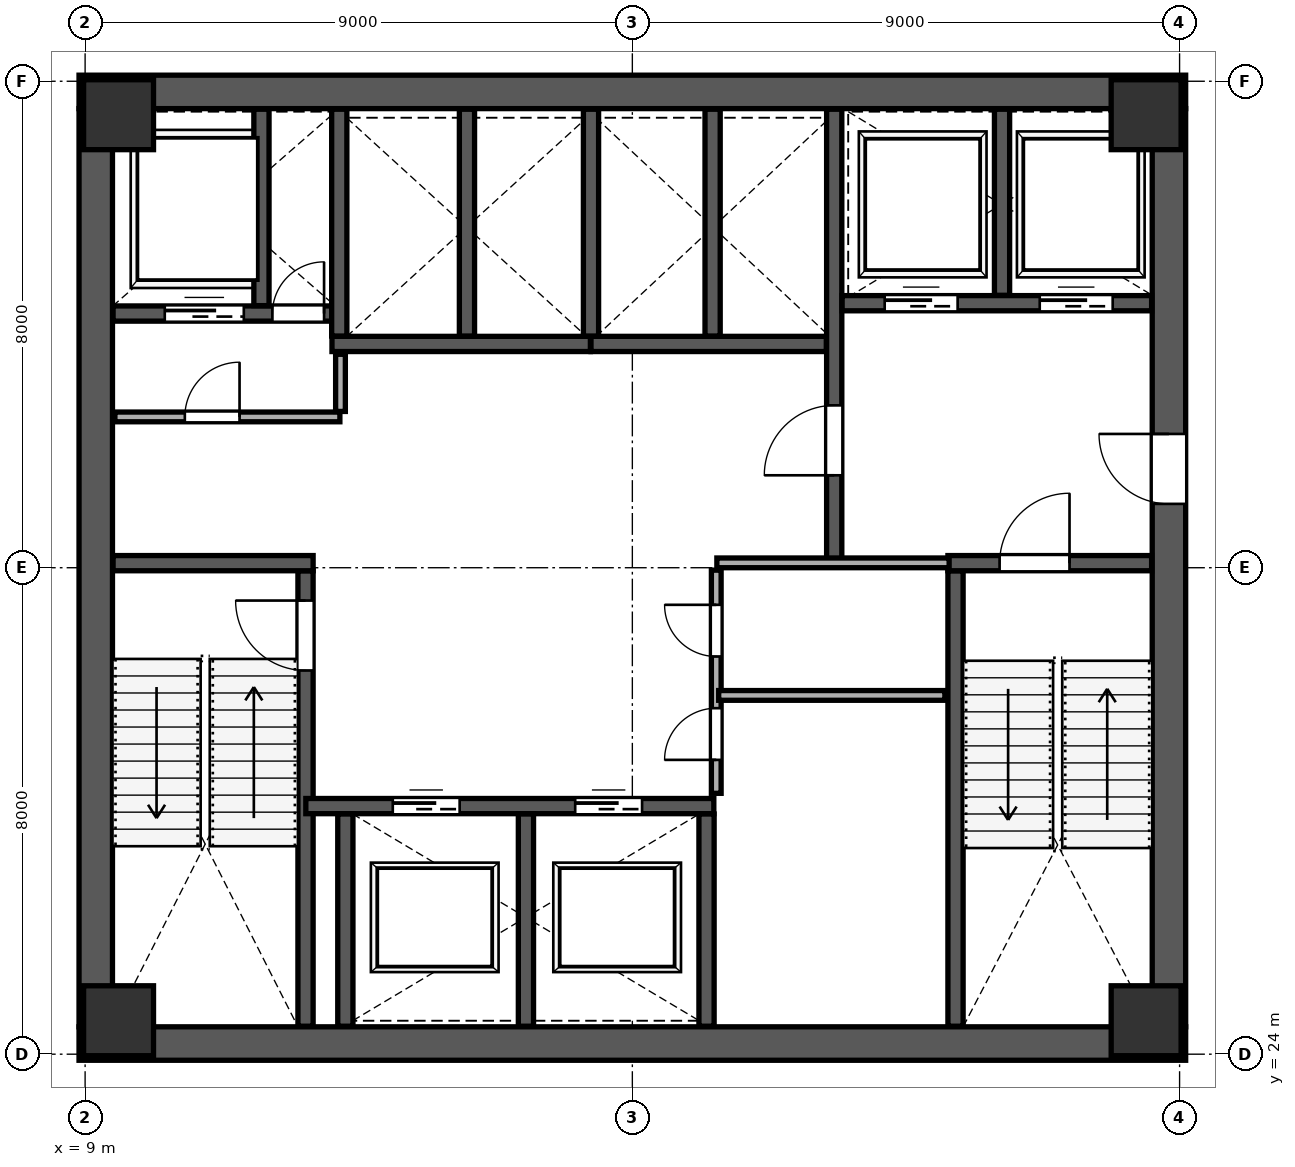
"""IFC4 building model, lengths in metres.
Left out: names, types, materials, properties, quantities, classifications, styles, units other than length and angle.
Written with IfcOpenShell. Run it as: python <this file> out.ifc"""

import sys

from ifc_helpers import new_model, si_unit, direction, frame, frame_2d, origin, origin_2d, place, context, subcontext, project, spatial, rectangle, extrude, source, transform, mapped, element, fill, save


model = new_model("IFC4")
c1 = context("Model", 3, precision=1e-05, world=origin(), true_north=direction((0.0, 1.0)))
c2 = subcontext(c1, "Body", "Model", "MODEL_VIEW")
j1 = project(units=[si_unit("LENGTHUNIT", "METRE"), si_unit("PLANEANGLEUNIT", "RADIAN")], contexts=[c1])
p1 = place(None, origin())
s1 = spatial("IfcSite", under=j1, at=p1, CompositionType="ELEMENT")
p2 = place(p1, origin())
s2 = spatial("IfcBuilding", under=s1, at=p2, CompositionType="ELEMENT")
p3 = place(p2, frame((0.0, 0.0, 83.2)))
s3 = spatial("IfcBuildingStorey", under=s2, at=p3, CompositionType="ELEMENT", Elevation=83.2)
m1 = source(origin(), c2, "Body", "SweptSolid", [
    extrude(rectangle(XDim=1.15, YDim=1.15, at=origin_2d()), origin(), (0.0, 0.0, 1.0), 4.198),
])
for number, where, z_axis, x_axis in (
    (1, (9.55, 24.55, 0.001), (0.0, 0.0, 1.0), (1.0, 0.0, 0.0)),
    (2, (26.45, 24.55, 0.001), (0.0, 0.0, 1.0), (1.0, 0.0, 0.0)),
    (3, (9.55, 39.45, 0.001), (0.0, 0.0, 1.0), (1.0, 0.0, 0.0)),
    (4, (26.45, 39.45, 0.001), (0.0, 0.0, 1.0), (1.0, 0.0, 0.0)),
):
    element("IfcColumn", number, at=place(p3, frame(where, z_axis=z_axis, x_axis=x_axis)), inside=s3, PredefinedType="COLUMN", context=c2, shape_type="MappedRepresentation", body=[
        mapped(m1, transform((0.0, 0.0, 0.0), scale=1.0)),
    ])
p4 = place(p3, frame((9.175, 24.45, 0.0), z_axis=(0.0, 0.0, 1.0), x_axis=(0.0, 1.0, 0.0)))
e5 = element("IfcWall", 5, at=p4, inside=s3, PredefinedType="SHEAR", context=c2, shape_type="SweptSolid", body=[
    extrude(rectangle(XDim=15.1, YDim=0.55, at=frame_2d((7.55, 0.0))), origin(), (0.0, 0.0, 1.0), 3.96),
])
p5 = place(p3, frame((26.825, 24.45, 0.0), z_axis=(0.0, 0.0, 1.0), x_axis=(0.0, 1.0, 0.0)))
e6 = element("IfcWall", 6, at=p5, inside=s3, PredefinedType="SHEAR", context=c2, shape_type="SweptSolid", body=[
    extrude(rectangle(XDim=15.1, YDim=0.55, at=frame_2d((7.55, 0.0))), origin(), (0.0, 0.0, 1.0), 3.96),
])
p6 = place(p5, frame((8.6, 0.0, 0.0)))
e7 = element("IfcOpeningElement", 7, at=p6, cuts=e6, PredefinedType="OPENING", context=c2, shape_type="SweptSolid", body=[
    extrude(rectangle(XDim=1.15, YDim=2.2, at=frame_2d((0.575, 1.1))), frame((0.0, 0.285, 0.0), z_axis=(0.0, -1.0, 0.0), x_axis=(1.0, 0.0, 0.0)), (0.0, 0.0, 1.0), 0.57),
])
for number, where, z_axis, x_axis in (
    (8, (8.9, 24.175, 0.0), (0.0, 0.0, 1.0), (1.0, 0.0, 0.0)),
    (9, (8.9, 39.825, 0.0), (0.0, 0.0, 1.0), (1.0, 0.0, 0.0)),
):
    element("IfcWall", number, at=place(p3, frame(where, z_axis=z_axis, x_axis=x_axis)), inside=s3, PredefinedType="SHEAR", context=c2, shape_type="SweptSolid", body=[
        extrude(rectangle(XDim=18.2, YDim=0.55, at=frame_2d((9.1, 0.0))), origin(), (0.0, 0.0, 1.0), 3.96),
    ])
p7 = place(p3, frame((12.625, 24.46, 0.0), z_axis=(0.0, 0.0, 1.0), x_axis=(0.0, 1.0, 0.0)))
e10 = element("IfcWall", 10, at=p7, inside=s3, PredefinedType="SHEAR", context=c2, shape_type="SweptSolid", body=[
    extrude(rectangle(XDim=7.49, YDim=0.25, at=frame_2d((3.745, 0.0))), origin(), (0.0, 0.0, 1.0), 3.96),
])
p8 = place(p7, frame((5.85, 0.0, 0.0)))
e11 = element("IfcOpeningElement", 11, at=p8, cuts=e10, PredefinedType="OPENING", context=c2, shape_type="SweptSolid", body=[
    extrude(rectangle(XDim=1.15, YDim=2.2, at=frame_2d((0.575, 1.1))), frame((0.0, 0.135, 0.0), z_axis=(0.0, -1.0, 0.0), x_axis=(1.0, 0.0, 0.0)), (0.0, 0.0, 1.0), 0.27),
])
p9 = place(p3, frame((9.46, 32.075, 0.0), z_axis=(0.0, 0.0, 1.0), x_axis=(1.0, 0.0, 0.0)))
e12 = element("IfcWall", 12, at=p9, inside=s3, PredefinedType="SHEAR", context=c2, shape_type="SweptSolid", body=[
    extrude(rectangle(XDim=3.29, YDim=0.25, at=frame_2d((1.645, 0.0))), origin(), (0.0, 0.0, 1.0), 3.96),
])
p10 = place(p3, frame((23.315, 24.46, 0.0), z_axis=(0.0, 0.0, 1.0), x_axis=(0.0, 1.0, 0.0)))
e13 = element("IfcWall", 13, at=p10, inside=s3, PredefinedType="SHEAR", context=c2, shape_type="SweptSolid", body=[
    extrude(rectangle(XDim=7.49, YDim=0.25, at=frame_2d((3.745, 0.0))), origin(), (0.0, 0.0, 1.0), 3.96),
])
p11 = place(p3, frame((23.19, 32.075, 0.0), z_axis=(0.0, 0.0, 1.0), x_axis=(1.0, 0.0, 0.0)))
e14 = element("IfcWall", 14, at=p11, inside=s3, PredefinedType="SHEAR", context=c2, shape_type="SweptSolid", body=[
    extrude(rectangle(XDim=3.35, YDim=0.25, at=frame_2d((1.675, 0.0))), origin(), (0.0, 0.0, 1.0), 3.96),
])
p12 = place(p11, frame((0.85, 0.0, 0.0)))
e15 = element("IfcOpeningElement", 15, at=p12, cuts=e14, PredefinedType="OPENING", context=c2, shape_type="SweptSolid", body=[
    extrude(rectangle(XDim=1.15, YDim=2.2, at=frame_2d((0.575, 1.1))), frame((0.0, 0.135, 0.0), z_axis=(0.0, -1.0, 0.0), x_axis=(1.0, 0.0, 0.0)), (0.0, 0.0, 1.0), 0.27),
])
p13 = place(p3, frame((21.32, 32.12, 0.0), z_axis=(0.0, 0.0, 1.0), x_axis=(0.0, 1.0, 0.0)))
e16 = element("IfcWall", 16, at=p13, inside=s3, PredefinedType="SHEAR", context=c2, shape_type="SweptSolid", body=[
    extrude(rectangle(XDim=7.42, YDim=0.25, at=frame_2d((3.71, 0.0))), origin(), (0.0, 0.0, 1.0), 3.96),
])
p14 = place(p13, frame((1.4, 0.0, 0.0)))
e17 = element("IfcOpeningElement", 17, at=p14, cuts=e16, PredefinedType="OPENING", context=c2, shape_type="SweptSolid", body=[
    extrude(rectangle(XDim=1.15, YDim=2.2, at=frame_2d((0.575, 1.1))), frame((0.0, 0.135, 0.0), z_axis=(0.0, -1.0, 0.0), x_axis=(1.0, 0.0, 0.0)), (0.0, 0.0, 1.0), 0.27),
])
p15 = place(p3, frame((9.46, 36.18, 0.0), z_axis=(0.0, 0.0, 1.0), x_axis=(1.0, 0.0, 0.0)))
e18 = element("IfcWall", 18, at=p15, inside=s3, PredefinedType="SHEAR", context=c2, shape_type="SweptSolid", body=[
    extrude(rectangle(XDim=3.79, YDim=0.25, at=frame_2d((1.895, 0.0))), origin(), (0.0, 0.0, 1.0), 3.96),
])
p16 = place(p15, frame((2.62, 0.0, 0.0)))
e19 = element("IfcOpeningElement", 19, at=p16, cuts=e18, PredefinedType="OPENING", context=c2, shape_type="SweptSolid", body=[
    extrude(rectangle(XDim=0.85, YDim=2.1, at=frame_2d((0.425, 1.05))), frame((0.0, 0.135, 0.0), z_axis=(0.0, -1.0, 0.0), x_axis=(1.0, 0.0, 0.0)), (0.0, 0.0, 1.0), 0.27),
])
p17 = place(p15, frame((0.85, 0.0, 0.0)))
e20 = element("IfcOpeningElement", 20, at=p17, cuts=e18, PredefinedType="OPENING", context=c2, shape_type="SweptSolid", body=[
    extrude(rectangle(XDim=1.3, YDim=2.25, at=frame_2d((0.65, 1.125))), frame((0.0, 0.135, 0.0), z_axis=(0.0, -1.0, 0.0), x_axis=(1.0, 0.0, 0.0)), (0.0, 0.0, 1.0), 0.27),
])
p18 = place(p3, frame((11.9, 36.31, 0.0), z_axis=(0.0, 0.0, 1.0), x_axis=(0.0, 1.0, 0.0)))
e21 = element("IfcWall", 21, at=p18, inside=s3, PredefinedType="SHEAR", context=c2, shape_type="SweptSolid", body=[
    extrude(rectangle(XDim=3.23, YDim=0.25, at=frame_2d((1.615, 0.0))), origin(), (0.0, 0.0, 1.0), 3.96),
])
p19 = place(p3, frame((21.45, 36.35, 0.0), z_axis=(0.0, 0.0, 1.0), x_axis=(1.0, 0.0, 0.0)))
e22 = element("IfcWall", 22, at=p19, inside=s3, PredefinedType="SHEAR", context=c2, shape_type="SweptSolid", body=[
    extrude(rectangle(XDim=5.09, YDim=0.25, at=frame_2d((2.545, 0.0))), origin(), (0.0, 0.0, 1.0), 3.96),
])
p20 = place(p19, frame((0.7, 0.0, 0.0)))
e23 = element("IfcOpeningElement", 23, at=p20, cuts=e22, PredefinedType="OPENING", context=c2, shape_type="SweptSolid", body=[
    extrude(rectangle(XDim=1.2, YDim=2.2, at=frame_2d((0.6, 1.1))), frame((0.0, 0.135, 0.0), z_axis=(0.0, -1.0, 0.0), x_axis=(1.0, 0.0, 0.0)), (0.0, 0.0, 1.0), 0.27),
])
p21 = place(p19, frame((3.25, 0.0, 0.0)))
e24 = element("IfcOpeningElement", 24, at=p21, cuts=e22, PredefinedType="OPENING", context=c2, shape_type="SweptSolid", body=[
    extrude(rectangle(XDim=1.2, YDim=2.2, at=frame_2d((0.6, 1.1))), frame((0.0, 0.135, 0.0), z_axis=(0.0, -1.0, 0.0), x_axis=(1.0, 0.0, 0.0)), (0.0, 0.0, 1.0), 0.27),
])
p22 = place(p3, frame((24.08, 36.48, 0.0), z_axis=(0.0, 0.0, 1.0), x_axis=(0.0, 1.0, 0.0)))
e25 = element("IfcWall", 25, at=p22, inside=s3, PredefinedType="SHEAR", context=c2, shape_type="SweptSolid", body=[
    extrude(rectangle(XDim=3.06, YDim=0.25, at=frame_2d((1.53, 0.0))), origin(), (0.0, 0.0, 1.0), 3.96),
])
p23 = place(p3, frame((12.63, 28.08, 0.0), z_axis=(0.0, 0.0, 1.0), x_axis=(1.0, 0.0, 0.0)))
e26 = element("IfcWall", 26, at=p23, inside=s3, PredefinedType="SHEAR", context=c2, shape_type="SweptSolid", body=[
    extrude(rectangle(XDim=6.71, YDim=0.25, at=frame_2d((3.355, 0.0))), origin(), (0.0, 0.0, 1.0), 3.96),
])
p24 = place(p23, frame((1.43, 0.0, 0.0)))
e27 = element("IfcOpeningElement", 27, at=p24, cuts=e26, PredefinedType="OPENING", context=c2, shape_type="SweptSolid", body=[
    extrude(rectangle(XDim=1.1, YDim=2.2, at=frame_2d((0.55, 1.1))), frame((0.0, 0.135, 0.0), z_axis=(0.0, -1.0, 0.0), x_axis=(1.0, 0.0, 0.0)), (0.0, 0.0, 1.0), 0.27),
])
p25 = place(p23, frame((4.43, 0.0, 0.0)))
e28 = element("IfcOpeningElement", 28, at=p25, cuts=e26, PredefinedType="OPENING", context=c2, shape_type="SweptSolid", body=[
    extrude(rectangle(XDim=1.1, YDim=2.2, at=frame_2d((0.55, 1.1))), frame((0.0, 0.135, 0.0), z_axis=(0.0, -1.0, 0.0), x_axis=(1.0, 0.0, 0.0)), (0.0, 0.0, 1.0), 0.27),
])
for number, where, z_axis, x_axis in (
    (29, (13.28, 24.46, 0.0), (0.0, 0.0, 1.0), (0.0, 1.0, 0.0)),
    (30, (16.25, 24.46, 0.0), (0.0, 0.0, 1.0), (0.0, 1.0, 0.0)),
    (31, (19.22, 24.46, 0.0), (0.0, 0.0, 1.0), (0.0, 1.0, 0.0)),
):
    element("IfcWall", number, at=place(p3, frame(where, z_axis=z_axis, x_axis=x_axis)), inside=s3, PredefinedType="SHEAR", context=c2, shape_type="SweptSolid", body=[
        extrude(rectangle(XDim=3.49, YDim=0.25, at=frame_2d((1.745, 0.0))), origin(), (0.0, 0.0, 1.0), 3.96),
    ])
p26 = place(p3, frame((13.06, 35.68, 0.0), z_axis=(0.0, 0.0, 1.0), x_axis=(1.0, 0.0, 0.0)))
e32 = element("IfcWall", 32, at=p26, inside=s3, PredefinedType="SHEAR", context=c2, shape_type="SweptSolid", body=[
    extrude(rectangle(XDim=4.25, YDim=0.25, at=frame_2d((2.125, 0.0))), origin(), (0.0, 0.0, 1.0), 3.96),
])
for number, where, z_axis, x_axis in (
    (33, (13.18, 35.81, 0.0), (0.0, 0.0, 1.0), (0.0, 1.0, 0.0)),
    (34, (15.28, 35.81, 0.0), (0.0, 0.0, 1.0), (0.0, 1.0, 0.0)),
):
    element("IfcWall", number, at=place(p3, frame(where, z_axis=z_axis, x_axis=x_axis)), inside=s3, PredefinedType="SHEAR", context=c2, shape_type="SweptSolid", body=[
        extrude(rectangle(XDim=3.73, YDim=0.25, at=frame_2d((1.865, 0.0))), origin(), (0.0, 0.0, 1.0), 3.96),
    ])
p27 = place(p3, frame((17.32, 35.68, 0.0), z_axis=(0.0, 0.0, 1.0), x_axis=(1.0, 0.0, 0.0)))
e35 = element("IfcWall", 35, at=p27, inside=s3, PredefinedType="SHEAR", context=c2, shape_type="SweptSolid", body=[
    extrude(rectangle(XDim=3.87, YDim=0.25, at=frame_2d((1.935, 0.0))), origin(), (0.0, 0.0, 1.0), 3.96),
])
for number, where, z_axis, x_axis in (
    (36, (17.32, 35.81, 0.0), (0.0, 0.0, 1.0), (0.0, 1.0, 0.0)),
    (37, (19.32, 35.81, 0.0), (0.0, 0.0, 1.0), (0.0, 1.0, 0.0)),
):
    element("IfcWall", number, at=place(p3, frame(where, z_axis=z_axis, x_axis=x_axis)), inside=s3, PredefinedType="SHEAR", context=c2, shape_type="SweptSolid", body=[
        extrude(rectangle(XDim=3.73, YDim=0.25, at=frame_2d((1.865, 0.0))), origin(), (0.0, 0.0, 1.0), 3.96),
    ])
p28 = place(p3, frame((9.49, 34.48, 0.0), z_axis=(0.0, 0.0, 1.0), x_axis=(1.0, 0.0, 0.0)))
e38 = element("IfcWall", 38, at=p28, inside=s3, PredefinedType="PARTITIONING", context=c2, shape_type="SweptSolid", body=[
    extrude(rectangle(XDim=3.7, YDim=0.16, at=frame_2d((1.85, 0.0))), origin(), (0.0, 0.0, 1.0), 3.96),
])
p29 = place(p28, frame((1.15, 0.0, 0.0)))
e39 = element("IfcOpeningElement", 39, at=p29, cuts=e38, PredefinedType="OPENING", context=c2, shape_type="SweptSolid", body=[
    extrude(rectangle(XDim=0.9, YDim=2.15, at=frame_2d((0.45, 1.075))), frame((0.0, 0.09, 0.0), z_axis=(0.0, -1.0, 0.0), x_axis=(1.0, 0.0, 0.0)), (0.0, 0.0, 1.0), 0.18),
])
p30 = place(p3, frame((13.2, 34.57, 0.0), z_axis=(0.0, 0.0, 1.0), x_axis=(0.0, 1.0, 0.0)))
e40 = element("IfcWall", 40, at=p30, inside=s3, PredefinedType="PARTITIONING", context=c2, shape_type="SweptSolid", body=[
    extrude(rectangle(XDim=0.94, YDim=0.16, at=frame_2d((0.47, 0.0))), origin(), (0.0, 0.0, 1.0), 3.96),
])
p31 = place(p3, frame((19.39, 32.08, 0.0), z_axis=(0.0, 0.0, 1.0), x_axis=(1.0, 0.0, 0.0)))
e41 = element("IfcWall", 41, at=p31, inside=s3, PredefinedType="PARTITIONING", context=c2, shape_type="SweptSolid", body=[
    extrude(rectangle(XDim=3.82, YDim=0.16, at=frame_2d((1.91, 0.0))), origin(), (0.0, 0.0, 1.0), 3.96),
])
p32 = place(p3, frame((19.38, 28.29, 0.0), z_axis=(0.0, 0.0, 1.0), x_axis=(0.0, 1.0, 0.0)))
e42 = element("IfcWall", 42, at=p32, inside=s3, PredefinedType="PARTITIONING", context=c2, shape_type="SweptSolid", body=[
    extrude(rectangle(XDim=3.67, YDim=0.16, at=frame_2d((1.835, 0.0))), origin(), (0.0, 0.0, 1.0), 3.96),
])
p33 = place(p32, frame((0.55, 0.0, 0.0)))
e43 = element("IfcOpeningElement", 43, at=p33, cuts=e42, PredefinedType="OPENING", context=c2, shape_type="SweptSolid", body=[
    extrude(rectangle(XDim=0.85, YDim=2.1, at=frame_2d((0.425, 1.05))), frame((0.0, 0.09, 0.0), z_axis=(0.0, -1.0, 0.0), x_axis=(1.0, 0.0, 0.0)), (0.0, 0.0, 1.0), 0.18),
])
p34 = place(p32, frame((2.25, 0.0, 0.0)))
e44 = element("IfcOpeningElement", 44, at=p34, cuts=e42, PredefinedType="OPENING", context=c2, shape_type="SweptSolid", body=[
    extrude(rectangle(XDim=0.85, YDim=2.1, at=frame_2d((0.425, 1.05))), frame((0.0, 0.09, 0.0), z_axis=(0.0, -1.0, 0.0), x_axis=(1.0, 0.0, 0.0)), (0.0, 0.0, 1.0), 0.18),
])
p35 = place(p3, frame((19.42, 29.9, 0.0), z_axis=(0.0, 0.0, 1.0), x_axis=(1.0, 0.0, 0.0)))
e45 = element("IfcWall", 45, at=p35, inside=s3, PredefinedType="PARTITIONING", context=c2, shape_type="SweptSolid", body=[
    extrude(rectangle(XDim=3.72, YDim=0.16, at=frame_2d((1.86, 0.0))), origin(), (0.0, 0.0, 1.0), 3.96),
])
p36 = place(p3, frame((27.067, 12.72, 0.0), z_axis=(0.0, 0.0, 1.0), x_axis=(0.173654514703, 0.984806635601, 0.0)))
e46 = element("IfcWall", 46, at=p36, inside=s3, PredefinedType="PARTITIONING", context=c2, shape_type="SweptSolid", body=[
    extrude(rectangle(XDim=21.08, YDim=0.16, at=frame_2d((10.54, 0.0))), origin(), (0.0, 0.0, 1.0), 3.96),
])
m2 = source(origin(), c2, "Body", "SweptSolid", [
    extrude(rectangle(XDim=1.15, YDim=2.2, at=frame_2d((0.575, 1.1))), frame((0.0, 0.025, 0.0), z_axis=(0.0, -1.0, 0.0), x_axis=(1.0, 0.0, 0.0)), (0.0, 0.0, 1.0), 0.05),
])
p37 = place(p8, origin())
e47 = element("IfcDoor", 47, at=p37, inside=s3, OperationType="SINGLE_SWING_RIGHT", PredefinedType="DOOR", context=c2, shape_type="MappedRepresentation", body=[
    mapped(m2, transform((0.0, 0.0, 0.0), scale=1.0)),
])
fill(e11, e47)
m3 = source(origin(), c2, "Body", "SweptSolid", [
    extrude(rectangle(XDim=1.15, YDim=2.2, at=frame_2d((0.575, 1.1))), frame((0.0, 0.025, 0.0), z_axis=(0.0, -1.0, 0.0), x_axis=(1.0, 0.0, 0.0)), (0.0, 0.0, 1.0), 0.05),
])
p38 = place(p14, origin())
e48 = element("IfcDoor", 48, at=p38, inside=s3, OperationType="SINGLE_SWING_LEFT", PredefinedType="DOOR", context=c2, shape_type="MappedRepresentation", body=[
    mapped(m3, transform((0.0, 0.0, 0.0), scale=1.0)),
])
fill(e17, e48)
p39 = place(p12, origin())
e49 = element("IfcDoor", 49, at=p39, inside=s3, OperationType="SINGLE_SWING_RIGHT", PredefinedType="DOOR", context=c2, shape_type="MappedRepresentation", body=[
    mapped(m2, transform((0.0, 0.0, 0.0), scale=1.0)),
])
fill(e15, e49)
p40 = place(p6, origin())
e50 = element("IfcDoor", 50, at=p40, inside=s3, OperationType="SINGLE_SWING_RIGHT", PredefinedType="DOOR", context=c2, shape_type="MappedRepresentation", body=[
    mapped(m3, transform((0.0, 0.0, 0.0), scale=1.0)),
])
fill(e7, e50)
m4 = source(origin(), c2, "Body", "SweptSolid", [
    extrude(rectangle(XDim=0.85, YDim=2.1, at=frame_2d((0.425, 1.05))), frame((0.0, 0.025, 0.0), z_axis=(0.0, -1.0, 0.0), x_axis=(1.0, 0.0, 0.0)), (0.0, 0.0, 1.0), 0.05),
])
p41 = place(p16, origin())
e51 = element("IfcDoor", 51, at=p41, inside=s3, OperationType="SINGLE_SWING_RIGHT", PredefinedType="DOOR", context=c2, shape_type="MappedRepresentation", body=[
    mapped(m4, transform((0.0, 0.0, 0.0), scale=1.0)),
])
fill(e19, e51)
m5 = source(origin(), c2, "Body", "SweptSolid", [
    extrude(rectangle(XDim=1.1, YDim=2.2, at=frame_2d((0.55, 1.1))), frame((0.0, 0.025, 0.0), z_axis=(0.0, -1.0, 0.0), x_axis=(1.0, 0.0, 0.0)), (0.0, 0.0, 1.0), 0.05),
])
p42 = place(p24, origin())
e52 = element("IfcDoor", 52, at=p42, inside=s3, OperationType="SLIDING_TO_LEFT", PredefinedType="DOOR", context=c2, shape_type="MappedRepresentation", body=[
    mapped(m5, transform((0.0, 0.0, 0.0), scale=1.0)),
])
fill(e27, e52)
p43 = place(p25, origin())
e53 = element("IfcDoor", 53, at=p43, inside=s3, OperationType="SLIDING_TO_RIGHT", PredefinedType="DOOR", context=c2, shape_type="MappedRepresentation", body=[
    mapped(m5, transform((0.0, 0.0, 0.0), scale=1.0)),
])
fill(e28, e53)
m6 = source(origin(), c2, "Body", "SweptSolid", [
    extrude(rectangle(XDim=1.2, YDim=2.2, at=frame_2d((0.6, 1.1))), frame((0.0, 0.025, 0.0), z_axis=(0.0, -1.0, 0.0), x_axis=(1.0, 0.0, 0.0)), (0.0, 0.0, 1.0), 0.05),
])
p44 = place(p20, origin())
e54 = element("IfcDoor", 54, at=p44, inside=s3, OperationType="SLIDING_TO_LEFT", PredefinedType="DOOR", context=c2, shape_type="MappedRepresentation", body=[
    mapped(m6, transform((0.0, 0.0, 0.0), scale=1.0)),
])
fill(e23, e54)
p45 = place(p21, origin())
e55 = element("IfcDoor", 55, at=p45, inside=s3, OperationType="SLIDING_TO_RIGHT", PredefinedType="DOOR", context=c2, shape_type="MappedRepresentation", body=[
    mapped(m6, transform((0.0, 0.0, 0.0), scale=1.0)),
])
fill(e24, e55)
m7 = source(origin(), c2, "Body", "SweptSolid", [
    extrude(rectangle(XDim=1.3, YDim=2.25, at=frame_2d((0.65, 1.125))), frame((0.0, 0.025, 0.0), z_axis=(0.0, -1.0, 0.0), x_axis=(1.0, 0.0, 0.0)), (0.0, 0.0, 1.0), 0.05),
])
p46 = place(p17, origin())
e56 = element("IfcDoor", 56, at=p46, inside=s3, OperationType="SLIDING_TO_LEFT", PredefinedType="DOOR", context=c2, shape_type="MappedRepresentation", body=[
    mapped(m7, transform((0.0, 0.0, 0.0), scale=1.0)),
])
fill(e20, e56)
m8 = source(origin(), c2, "Body", "SweptSolid", [
    extrude(rectangle(XDim=0.9, YDim=2.15, at=frame_2d((0.45, 1.075))), frame((0.0, 0.025, 0.0), z_axis=(0.0, -1.0, 0.0), x_axis=(1.0, 0.0, 0.0)), (0.0, 0.0, 1.0), 0.05),
])
p47 = place(p29, origin())
e57 = element("IfcDoor", 57, at=p47, inside=s3, OperationType="SINGLE_SWING_RIGHT", PredefinedType="DOOR", context=c2, shape_type="MappedRepresentation", body=[
    mapped(m8, transform((0.0, 0.0, 0.0), scale=1.0)),
])
fill(e39, e57)
p48 = place(p33, origin())
e58 = element("IfcDoor", 58, at=p48, inside=s3, OperationType="SINGLE_SWING_LEFT", PredefinedType="DOOR", context=c2, shape_type="MappedRepresentation", body=[
    mapped(m4, transform((0.0, 0.0, 0.0), scale=1.0)),
])
fill(e43, e58)
p49 = place(p34, origin())
e59 = element("IfcDoor", 59, at=p49, inside=s3, OperationType="SINGLE_SWING_RIGHT", PredefinedType="DOOR", context=c2, shape_type="MappedRepresentation", body=[
    mapped(m4, transform((0.0, 0.0, 0.0), scale=1.0)),
])
fill(e44, e59)
save(model, sys.argv[1])
